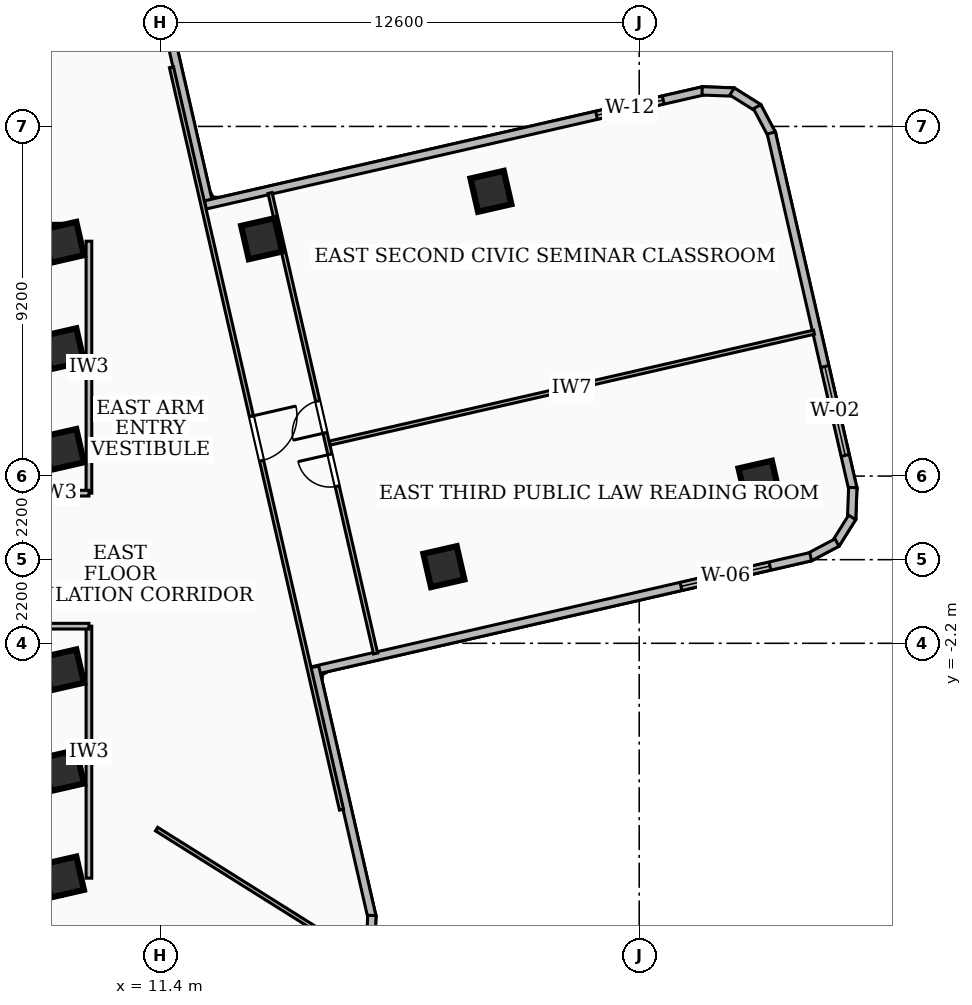
"""IFC4 building model, lengths in metres.
Left out: names, types, materials, properties, quantities, classifications, styles, units other than length and angle.
Written with IfcOpenShell. Run it as: python <this file> out.ifc"""

import sys

from ifc_helpers import new_model, si_unit, direction, frame, frame_2d, origin, origin_2d, place, context, subcontext, project, spatial, rectangle, extrude, element, fill, save


model = new_model("IFC4")
c1 = context("Model", 3, precision=1e-05, world=origin(), true_north=direction((0.0, 1.0)))
c2 = subcontext(c1, "Body", "Model", "MODEL_VIEW")
j1 = project(units=[si_unit("LENGTHUNIT", "METRE"), si_unit("PLANEANGLEUNIT", "RADIAN")], contexts=[c1])
p1 = place(None, origin())
s1 = spatial("IfcSite", under=j1, at=p1, CompositionType="ELEMENT")
p2 = place(p1, origin())
s2 = spatial("IfcBuilding", under=s1, at=p2, CompositionType="ELEMENT")
p3 = place(p2, frame((0.0, 0.0, 116.28)))
s3 = spatial("IfcBuildingStorey", under=s2, at=p3, CompositionType="ELEMENT", Elevation=116.28)
for number, where, z_axis, x_axis in (
    (1, (-8.78, 8.56, 0.0), (0.0, 0.0, 1.0), (1.0, 0.0, 0.0)),
    (2, (8.78, -8.56, 0.0), (0.0, 0.0, 1.0), (-1.0, 0.0, 0.0)),
):
    element("IfcWall", number, at=place(p3, frame(where, z_axis=z_axis, x_axis=x_axis)), inside=s3, PredefinedType="SHEAR", context=c2, shape_type="SweptSolid", body=[
        extrude(rectangle(XDim=17.56, YDim=0.5, at=frame_2d((8.78, 0.0))), origin(), (0.0, 0.0, 1.0), 3.34),
    ])
for number, where, z_axis, x_axis in (
    (3, (8.85, -5.55, 0.0), (0.0, 0.0, 1.0), (0.975, 0.223, 0.0)),
    (4, (8.85, -2.9, 0.0), (0.0, 0.0, 1.0), (0.975, 0.223, 0.0)),
    (5, (8.85, 2.9, 0.0), (0.0, 0.0, 1.0), (0.975, 0.223, 0.0)),
    (6, (8.85, 5.55, 0.0), (0.0, 0.0, 1.0), (0.975, 0.223, 0.0)),
    (7, (8.85, -8.35, 0.0), (0.0, 0.0, 1.0), (0.975, 0.223, 0.0)),
    (8, (8.85, 8.35, 0.0), (0.0, 0.0, 1.0), (0.975, 0.223, 0.0)),
    (9, (18.86, -0.183, 0.0), (0.0, 0.0, 1.0), (0.975, 0.223, 0.0)),
    (10, (14.064, 8.445, 0.0), (0.0, 0.0, 1.0), (0.975, 0.223, 0.0)),
    (11, (27.153, 2.064, 0.0), (0.0, 0.0, 1.0), (0.975, 0.223, 0.0)),
    (12, (20.098, 9.692, 0.0), (0.0, 0.0, 1.0), (0.975, 0.223, 0.0)),
):
    element("IfcColumn", number, at=place(p3, frame(where, z_axis=z_axis, x_axis=x_axis)), inside=s3, PredefinedType="COLUMN", context=c2, shape_type="SweptSolid", body=[
        extrude(rectangle(XDim=0.9, YDim=0.9, at=origin_2d()), origin(), (0.0, 0.0, 1.0), 3.6),
    ])
p4 = place(p3, frame((11.182, 15.857, 0.0), z_axis=(0.0, 0.0, 1.0), x_axis=(0.223278912438, -0.974754598481, 0.0)))
e13 = element("IfcWall", 13, at=p4, inside=s3, PredefinedType="SOLIDWALL", context=c2, shape_type="SweptSolid", body=[
    extrude(rectangle(XDim=6.759, YDim=0.22, at=frame_2d((3.379, 0.0))), origin(), (0.0, 0.0, 1.0), 3.34),
])
p5 = place(p3, frame((12.585, 9.335, 0.0), z_axis=(0.0, 0.0, 1.0), x_axis=(0.974754036658, 0.223281365141, 0.0)))
e14 = element("IfcWall", 14, at=p5, inside=s3, PredefinedType="SOLIDWALL", context=c2, shape_type="SweptSolid", body=[
    extrude(rectangle(XDim=13.459, YDim=0.22, at=frame_2d((6.729, 0.0))), origin(), (0.0, 0.0, 1.0), 3.34),
])
p6 = place(p5, frame((10.559, 0.0, 0.85)))
e15 = element("IfcOpeningElement", 15, at=p6, cuts=e14, PredefinedType="OPENING", context=c2, shape_type="SweptSolid", body=[
    extrude(rectangle(XDim=1.8, YDim=1.6, at=frame_2d((0.9, 0.8))), frame((0.0, 0.12, 0.0), z_axis=(0.0, -1.0, 0.0), x_axis=(1.0, 0.0, 0.0)), (0.0, 0.0, 1.0), 0.24),
])
p7 = place(p3, frame((25.655, 12.335, 0.0), z_axis=(0.0, 0.0, 1.0), x_axis=(0.999352376715, -0.035983706773, 0.0)))
e16 = element("IfcWall", 16, at=p7, inside=s3, PredefinedType="SOLIDWALL", context=c2, shape_type="SweptSolid", body=[
    extrude(rectangle(XDim=0.834, YDim=0.22, at=frame_2d((0.417, 0.0))), origin(), (0.0, 0.0, 1.0), 3.34),
])
p8 = place(p3, frame((26.443, 12.319, 0.0), z_axis=(0.0, 0.0, 1.0), x_axis=(0.846889988853, -0.531768132536, 0.0)))
e17 = element("IfcWall", 17, at=p8, inside=s3, PredefinedType="SOLIDWALL", context=c2, shape_type="SweptSolid", body=[
    extrude(rectangle(XDim=0.818, YDim=0.22, at=frame_2d((0.409, 0.0))), origin(), (0.0, 0.0, 1.0), 3.34),
])
p9 = place(p3, frame((27.103, 11.919, 0.0), z_axis=(0.0, 0.0, 1.0), x_axis=(0.468506090516, -0.883460266876, 0.0)))
e18 = element("IfcWall", 18, at=p9, inside=s3, PredefinedType="SOLIDWALL", context=c2, shape_type="SweptSolid", body=[
    extrude(rectangle(XDim=0.834, YDim=0.22, at=frame_2d((0.417, 0.0))), origin(), (0.0, 0.0, 1.0), 3.34),
])
p10 = place(p3, frame((27.476, 11.228, 0.0), z_axis=(0.0, 0.0, 1.0), x_axis=(0.223358074049, -0.974736462208, 0.0)))
e19 = element("IfcWall", 19, at=p10, inside=s3, PredefinedType="SOLIDWALL", context=c2, shape_type="SweptSolid", body=[
    extrude(rectangle(XDim=9.621, YDim=0.22, at=frame_2d((4.811, 0.0))), origin(), (0.0, 0.0, 1.0), 3.34),
])
p11 = place(p10, frame((6.304, 0.0, 0.85)))
e20 = element("IfcOpeningElement", 20, at=p11, cuts=e19, PredefinedType="OPENING", context=c2, shape_type="SweptSolid", body=[
    extrude(rectangle(XDim=2.4, YDim=2.1, at=frame_2d((1.2, 1.05))), frame((0.0, 0.12, 0.0), z_axis=(0.0, -1.0, 0.0), x_axis=(1.0, 0.0, 0.0)), (0.0, 0.0, 1.0), 0.24),
])
p12 = place(p3, frame((29.62, 1.899, 0.0), z_axis=(0.0, 0.0, 1.0), x_axis=(-0.037195813461, -0.999307996296, 0.0)))
e21 = element("IfcWall", 21, at=p12, inside=s3, PredefinedType="SOLIDWALL", context=c2, shape_type="SweptSolid", body=[
    extrude(rectangle(XDim=0.833, YDim=0.22, at=frame_2d((0.417, 0.0))), origin(), (0.0, 0.0, 1.0), 3.34),
])
p13 = place(p3, frame((29.603, 1.112, 0.0), z_axis=(0.0, 0.0, 1.0), x_axis=(-0.530240177466, -0.847847482865, 0.0)))
e22 = element("IfcWall", 22, at=p13, inside=s3, PredefinedType="SOLIDWALL", context=c2, shape_type="SweptSolid", body=[
    extrude(rectangle(XDim=0.819, YDim=0.22, at=frame_2d((0.409, 0.0))), origin(), (0.0, 0.0, 1.0), 3.34),
])
p14 = place(p3, frame((29.204, 0.451, 0.0), z_axis=(0.0, 0.0, 1.0), x_axis=(-0.883716798585, -0.468022029287, 0.0)))
e23 = element("IfcWall", 23, at=p14, inside=s3, PredefinedType="SOLIDWALL", context=c2, shape_type="SweptSolid", body=[
    extrude(rectangle(XDim=0.835, YDim=0.22, at=frame_2d((0.417, 0.0))), origin(), (0.0, 0.0, 1.0), 3.34),
])
p15 = place(p3, frame((28.512, 0.078, 0.0), z_axis=(0.0, 0.0, 1.0), x_axis=(-0.974753462872, -0.223283870038, 0.0)))
e24 = element("IfcWall", 24, at=p15, inside=s3, PredefinedType="SOLIDWALL", context=c2, shape_type="SweptSolid", body=[
    extrude(rectangle(XDim=13.458, YDim=0.22, at=frame_2d((6.729, 0.0))), origin(), (0.0, 0.0, 1.0), 3.34),
])
p16 = place(p15, frame((1.1, 0.0, 0.85)))
e25 = element("IfcOpeningElement", 25, at=p16, cuts=e24, PredefinedType="OPENING", context=c2, shape_type="SweptSolid", body=[
    extrude(rectangle(XDim=2.4, YDim=1.85, at=frame_2d((1.2, 0.925))), frame((0.0, 0.12, 0.0), z_axis=(0.0, -1.0, 0.0), x_axis=(1.0, 0.0, 0.0)), (0.0, 0.0, 1.0), 0.24),
])
p17 = place(p3, frame((15.46, -2.821, 0.0), z_axis=(0.0, 0.0, 1.0), x_axis=(0.223278912438, -0.974754598481, 0.0)))
e26 = element("IfcWall", 26, at=p17, inside=s3, PredefinedType="SOLIDWALL", context=c2, shape_type="SweptSolid", body=[
    extrude(rectangle(XDim=6.759, YDim=0.22, at=frame_2d((3.379, 0.0))), origin(), (0.0, 0.0, 1.0), 3.34),
])
p18 = place(p3, frame((16.964, -9.36, 0.0), z_axis=(0.0, 0.0, 1.0), x_axis=(-0.035983706773, -0.999352376715, 0.0)))
e27 = element("IfcWall", 27, at=p18, inside=s3, PredefinedType="SOLIDWALL", context=c2, shape_type="SweptSolid", body=[
    extrude(rectangle(XDim=0.834, YDim=0.22, at=frame_2d((0.417, 0.0))), origin(), (0.0, 0.0, 1.0), 3.34),
])
p19 = place(p3, frame((9.52, 1.75, 0.0), z_axis=(0.0, 0.0, 1.0), x_axis=(0.0, 1.0, 0.0)))
e28 = element("IfcWall", 28, at=p19, inside=s3, PredefinedType="PARTITIONING", context=c2, shape_type="SweptSolid", body=[
    extrude(rectangle(XDim=6.63, YDim=0.15, at=frame_2d((3.315, 0.0))), origin(), (0.0, 0.0, 1.0), 2.57),
])
p20 = place(p3, frame((7.85, 1.75, 0.0), z_axis=(0.0, 0.0, 1.0), x_axis=(1.0, 0.0, 0.0)))
e29 = element("IfcWall", 29, at=p20, inside=s3, PredefinedType="PARTITIONING", context=c2, shape_type="SweptSolid", body=[
    extrude(rectangle(XDim=1.67, YDim=0.15, at=frame_2d((0.835, 0.0))), origin(), (0.0, 0.0, 1.0), 2.57),
])
p21 = place(p3, frame((9.52, -8.38, 0.0), z_axis=(0.0, 0.0, 1.0), x_axis=(0.0, 1.0, 0.0)))
e30 = element("IfcWall", 30, at=p21, inside=s3, PredefinedType="PARTITIONING", context=c2, shape_type="SweptSolid", body=[
    extrude(rectangle(XDim=6.63, YDim=0.15, at=frame_2d((3.315, 0.0))), origin(), (0.0, 0.0, 1.0), 2.57),
])
p22 = place(p3, frame((7.85, -1.75, 0.0), z_axis=(0.0, 0.0, 1.0), x_axis=(1.0, 0.0, 0.0)))
e31 = element("IfcWall", 31, at=p22, inside=s3, PredefinedType="PARTITIONING", context=c2, shape_type="SweptSolid", body=[
    extrude(rectangle(XDim=1.67, YDim=0.15, at=frame_2d((0.835, 0.0))), origin(), (0.0, 0.0, 1.0), 2.57),
])
p23 = place(p3, frame((6.512, 10.38, 0.0), z_axis=(0.0, 0.0, 1.0), x_axis=(0.531323053356, 0.847169294163, 0.0)))
e32 = element("IfcWall", 32, at=p23, inside=s3, PredefinedType="PARTITIONING", context=c2, shape_type="SweptSolid", body=[
    extrude(rectangle(XDim=7.421, YDim=0.11, at=frame_2d((3.711, 0.0))), origin(), (0.0, 0.0, 1.0), 2.57),
])
p24 = place(p3, frame((11.3, -7.089, 0.0), z_axis=(0.0, 0.0, 1.0), x_axis=(0.847172398776, -0.531318103167, 0.0)))
e33 = element("IfcWall", 33, at=p24, inside=s3, PredefinedType="PARTITIONING", context=c2, shape_type="SweptSolid", body=[
    extrude(rectangle(XDim=6.335, YDim=0.11, at=frame_2d((3.167, 0.0))), origin(), (0.0, 0.0, 1.0), 3.34),
])
p25 = place(p3, frame((11.692, 12.957, 0.0), z_axis=(0.0, 0.0, 1.0), x_axis=(0.223262093598, -0.97475845088, 0.0)))
e34 = element("IfcWall", 34, at=p25, inside=s3, PredefinedType="PARTITIONING", context=c2, shape_type="SweptSolid", body=[
    extrude(rectangle(XDim=20.04, YDim=0.11, at=frame_2d((10.02, 0.0))), origin(), (0.0, 0.0, 1.0), 2.57),
])
p26 = place(p25, frame((9.42, 0.0, 0.0)))
e35 = element("IfcOpeningElement", 35, at=p26, cuts=e34, PredefinedType="OPENING", context=c2, shape_type="SweptSolid", body=[
    extrude(rectangle(XDim=1.2, YDim=2.1, at=frame_2d((0.6, 1.05))), frame((0.0, 0.065, 0.0), z_axis=(0.0, -1.0, 0.0), x_axis=(1.0, 0.0, 0.0)), (0.0, 0.0, 1.0), 0.13),
])
p27 = place(p3, frame((15.855, 3.067, 0.0), z_axis=(0.0, 0.0, 1.0), x_axis=(0.974758398925, 0.223262320434, 0.0)))
e36 = element("IfcWall", 36, at=p27, inside=s3, PredefinedType="PARTITIONING", context=c2, shape_type="SweptSolid", body=[
    extrude(rectangle(XDim=13.075, YDim=0.11, at=frame_2d((6.538, 0.0))), origin(), (0.0, 0.0, 1.0), 2.72),
])
p28 = place(p3, frame((17.062, -2.468, 0.0), z_axis=(0.0, 0.0, 1.0), x_axis=(-0.223341555051, 0.974740247341, 0.0)))
e37 = element("IfcWall", 37, at=p28, inside=s3, PredefinedType="PARTITIONING", context=c2, shape_type="SweptSolid", body=[
    extrude(rectangle(XDim=12.43, YDim=0.11, at=frame_2d((6.215, 0.0))), origin(), (0.0, 0.0, 1.0), 2.57),
])
p29 = place(p28, frame((4.515, 0.0, 0.0)))
e38 = element("IfcOpeningElement", 38, at=p29, cuts=e37, PredefinedType="OPENING", context=c2, shape_type="SweptSolid", body=[
    extrude(rectangle(XDim=0.86, YDim=2.04, at=frame_2d((0.43, 1.02))), frame((0.0, 0.065, 0.0), z_axis=(0.0, -1.0, 0.0), x_axis=(1.0, 0.0, 0.0)), (0.0, 0.0, 1.0), 0.13),
])
p30 = place(p28, frame((5.955, 0.0, 0.0)))
e39 = element("IfcOpeningElement", 39, at=p30, cuts=e37, PredefinedType="OPENING", context=c2, shape_type="SweptSolid", body=[
    extrude(rectangle(XDim=0.86, YDim=2.04, at=frame_2d((0.43, 1.02))), frame((0.0, 0.065, 0.0), z_axis=(0.0, -1.0, 0.0), x_axis=(1.0, 0.0, 0.0)), (0.0, 0.0, 1.0), 0.13),
])
p31 = place(p6, origin())
e40 = element("IfcWindow", 40, at=p31, inside=s3, PartitioningType="SINGLE_PANEL", PredefinedType="WINDOW", context=c2, shape_type="SweptSolid", body=[
    extrude(rectangle(XDim=1.8, YDim=1.6, at=frame_2d((0.9, 0.8))), frame((0.0, 0.03, 0.0), z_axis=(0.0, -1.0, 0.0), x_axis=(1.0, 0.0, 0.0)), (0.0, 0.0, 1.0), 0.06),
])
fill(e15, e40)
p32 = place(p11, origin())
e41 = element("IfcWindow", 41, at=p32, inside=s3, PartitioningType="SINGLE_PANEL", PredefinedType="WINDOW", context=c2, shape_type="SweptSolid", body=[
    extrude(rectangle(XDim=2.4, YDim=2.1, at=frame_2d((1.2, 1.05))), frame((0.0, 0.03, 0.0), z_axis=(0.0, -1.0, 0.0), x_axis=(1.0, 0.0, 0.0)), (0.0, 0.0, 1.0), 0.06),
])
fill(e20, e41)
p33 = place(p16, origin())
e42 = element("IfcWindow", 42, at=p33, inside=s3, PartitioningType="SINGLE_PANEL", PredefinedType="WINDOW", context=c2, shape_type="SweptSolid", body=[
    extrude(rectangle(XDim=2.4, YDim=1.85, at=frame_2d((1.2, 0.925))), frame((0.0, 0.03, 0.0), z_axis=(0.0, -1.0, 0.0), x_axis=(1.0, 0.0, 0.0)), (0.0, 0.0, 1.0), 0.06),
])
fill(e25, e42)
p34 = place(p26, origin())
e43 = element("IfcDoor", 43, at=p34, inside=s3, OperationType="SINGLE_SWING_LEFT", PredefinedType="DOOR", context=c2, shape_type="SweptSolid", body=[
    extrude(rectangle(XDim=1.2, YDim=2.1, at=frame_2d((0.6, 1.05))), frame((0.0, 0.025, 0.0), z_axis=(0.0, -1.0, 0.0), x_axis=(1.0, 0.0, 0.0)), (0.0, 0.0, 1.0), 0.05),
])
fill(e35, e43)
p35 = place(p29, origin())
e44 = element("IfcDoor", 44, at=p35, inside=s3, OperationType="SINGLE_SWING_RIGHT", PredefinedType="DOOR", context=c2, shape_type="SweptSolid", body=[
    extrude(rectangle(XDim=0.86, YDim=2.04, at=frame_2d((0.43, 1.02))), frame((0.0, 0.025, 0.0), z_axis=(0.0, -1.0, 0.0), x_axis=(1.0, 0.0, 0.0)), (0.0, 0.0, 1.0), 0.05),
])
fill(e38, e44)
p36 = place(p30, origin())
e45 = element("IfcDoor", 45, at=p36, inside=s3, OperationType="SINGLE_SWING_LEFT", PredefinedType="DOOR", context=c2, shape_type="SweptSolid", body=[
    extrude(rectangle(XDim=0.86, YDim=2.04, at=frame_2d((0.43, 1.02))), frame((0.0, 0.025, 0.0), z_axis=(0.0, -1.0, 0.0), x_axis=(1.0, 0.0, 0.0)), (0.0, 0.0, 1.0), 0.05),
])
fill(e39, e45)
save(model, sys.argv[1])
